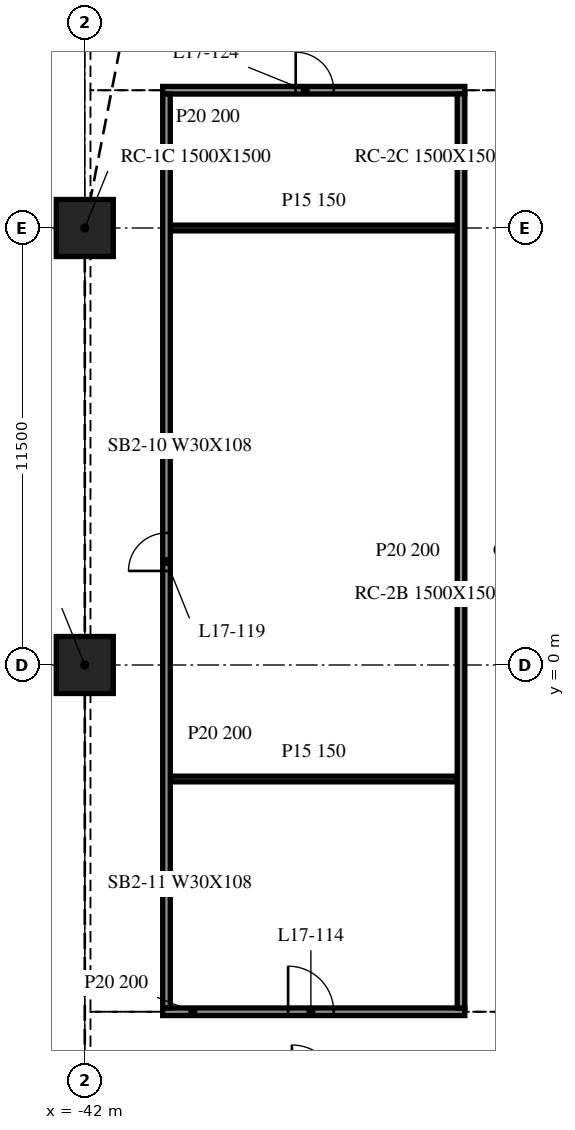
"""IFC4 building model, lengths in metres.
Left out: names, types, materials, properties, quantities, classifications, styles, units other than length and angle.
Written with IfcOpenShell. Run it as: python <this file> out.ifc"""

import sys

from ifc_helpers import new_model, si_unit, direction, frame, frame_2d, origin, origin_2d, place, context, subcontext, project, spatial, rectangle, extrude, element, fill, save


model = new_model("IFC4")
c1 = context("Model", 3, precision=1e-05, world=origin(), true_north=direction((0.0, 1.0)))
c2 = subcontext(c1, "Body", "Model", "MODEL_VIEW")
j1 = project(units=[si_unit("LENGTHUNIT", "METRE"), si_unit("PLANEANGLEUNIT", "RADIAN")], contexts=[c1])
p1 = place(None, origin())
s1 = spatial("IfcSite", under=j1, at=p1, CompositionType="ELEMENT")
p2 = place(p1, origin())
s2 = spatial("IfcBuilding", under=s1, at=p2, CompositionType="ELEMENT")
p3 = place(p2, frame((0.0, 0.0, 76.1)))
s3 = spatial("IfcBuildingStorey", under=s2, at=p3, CompositionType="ELEMENT", Elevation=76.1)
for number, where, z_axis, x_axis in (
    (1, (-42.0, 0.0, -0.34), (0.0, 0.0, 1.0), (1.0, 0.0, 0.0)),
    (2, (-42.0, 11.5, -0.34), (0.0, 0.0, 1.0), (1.0, 0.0, 0.0)),
):
    element("IfcColumn", number, at=place(p3, frame(where, z_axis=z_axis, x_axis=x_axis)), inside=s3, PredefinedType="COLUMN", context=c2, shape_type="SweptSolid", body=[
        extrude(rectangle(XDim=1.5, YDim=1.5, at=origin_2d()), origin(), (0.0, 0.0, 1.0), 4.09),
    ])
p4 = place(p3, frame((-39.95, -9.125, 0.0), z_axis=(0.0, 0.0, 1.0), x_axis=(1.0, 0.0, 0.0)))
e3 = element("IfcWall", 3, at=p4, inside=s3, PredefinedType="PARTITIONING", context=c2, shape_type="SweptSolid", body=[
    extrude(rectangle(XDim=7.95, YDim=0.2, at=frame_2d((3.975, 0.0))), origin(), (0.0, 0.0, 1.0), 3.75),
])
p5 = place(p4, frame((3.3, 0.0, 0.0)))
e4 = element("IfcOpeningElement", 4, at=p5, cuts=e3, PredefinedType="OPENING", context=c2, shape_type="SweptSolid", body=[
    extrude(rectangle(XDim=1.2, YDim=2.1, at=frame_2d((0.6, 1.05))), frame((0.0, 0.11, 0.0), z_axis=(0.0, -1.0, 0.0), x_axis=(1.0, 0.0, 0.0)), (0.0, 0.0, 1.0), 0.22),
])
for number, where, z_axis, x_axis in (
    (5, (-39.75, -3.0, 0.0), (0.0, 0.0, 1.0), (1.0, 0.0, 0.0)),
    (6, (-39.75, 11.5, 0.0), (0.0, 0.0, 1.0), (1.0, 0.0, 0.0)),
):
    element("IfcWall", number, at=place(p3, frame(where, z_axis=z_axis, x_axis=x_axis)), inside=s3, PredefinedType="PARTITIONING", context=c2, shape_type="SweptSolid", body=[
        extrude(rectangle(XDim=7.55, YDim=0.15, at=frame_2d((3.775, 0.0))), origin(), (0.0, 0.0, 1.0), 3.75),
    ])
p6 = place(p3, frame((-39.95, 15.125, 0.0), z_axis=(0.0, 0.0, 1.0), x_axis=(1.0, 0.0, 0.0)))
e7 = element("IfcWall", 7, at=p6, inside=s3, PredefinedType="PARTITIONING", context=c2, shape_type="SweptSolid", body=[
    extrude(rectangle(XDim=7.95, YDim=0.2, at=frame_2d((3.975, 0.0))), origin(), (0.0, 0.0, 1.0), 3.75),
])
p7 = place(p6, frame((3.5, 0.0, 0.0)))
e8 = element("IfcOpeningElement", 8, at=p7, cuts=e7, PredefinedType="OPENING", context=c2, shape_type="SweptSolid", body=[
    extrude(rectangle(XDim=1.0, YDim=2.1, at=frame_2d((0.5, 1.05))), frame((0.0, 0.11, 0.0), z_axis=(0.0, -1.0, 0.0), x_axis=(1.0, 0.0, 0.0)), (0.0, 0.0, 1.0), 0.22),
])
p8 = place(p3, frame((-39.85, -9.025, 0.0), z_axis=(0.0, 0.0, 1.0), x_axis=(0.0, 1.0, 0.0)))
e9 = element("IfcWall", 9, at=p8, inside=s3, PredefinedType="PARTITIONING", context=c2, shape_type="SweptSolid", body=[
    extrude(rectangle(XDim=24.05, YDim=0.2, at=frame_2d((12.025, 0.0))), origin(), (0.0, 0.0, 1.0), 3.75),
])
p9 = place(p8, frame((11.5, 0.0, 0.0)))
e10 = element("IfcOpeningElement", 10, at=p9, cuts=e9, PredefinedType="OPENING", context=c2, shape_type="SweptSolid", body=[
    extrude(rectangle(XDim=1.0, YDim=2.1, at=frame_2d((0.5, 1.05))), frame((0.0, 0.11, 0.0), z_axis=(0.0, -1.0, 0.0), x_axis=(1.0, 0.0, 0.0)), (0.0, 0.0, 1.0), 0.22),
])
p10 = place(p3, frame((-32.1, -9.025, 0.0), z_axis=(0.0, 0.0, 1.0), x_axis=(0.0, 1.0, 0.0)))
e11 = element("IfcWall", 11, at=p10, inside=s3, PredefinedType="PARTITIONING", context=c2, shape_type="SweptSolid", body=[
    extrude(rectangle(XDim=24.05, YDim=0.2, at=frame_2d((12.025, 0.0))), origin(), (0.0, 0.0, 1.0), 3.75),
])
p11 = place(p5, origin())
e12 = element("IfcDoor", 12, at=p11, inside=s3, OperationType="SINGLE_SWING_LEFT", PredefinedType="DOOR", context=c2, shape_type="SweptSolid", body=[
    extrude(rectangle(XDim=1.2, YDim=2.1, at=frame_2d((0.6, 1.05))), frame((0.0, 0.025, 0.0), z_axis=(0.0, -1.0, 0.0), x_axis=(1.0, 0.0, 0.0)), (0.0, 0.0, 1.0), 0.05),
])
fill(e4, e12)
p12 = place(p9, origin())
e13 = element("IfcDoor", 13, at=p12, inside=s3, OperationType="SINGLE_SWING_RIGHT", PredefinedType="DOOR", context=c2, shape_type="SweptSolid", body=[
    extrude(rectangle(XDim=1.0, YDim=2.1, at=frame_2d((0.5, 1.05))), frame((0.0, 0.025, 0.0), z_axis=(0.0, -1.0, 0.0), x_axis=(1.0, 0.0, 0.0)), (0.0, 0.0, 1.0), 0.05),
])
fill(e10, e13)
p13 = place(p7, origin())
e14 = element("IfcDoor", 14, at=p13, inside=s3, OperationType="SINGLE_SWING_LEFT", PredefinedType="DOOR", context=c2, shape_type="SweptSolid", body=[
    extrude(rectangle(XDim=1.0, YDim=2.1, at=frame_2d((0.5, 1.05))), frame((0.0, 0.025, 0.0), z_axis=(0.0, -1.0, 0.0), x_axis=(1.0, 0.0, 0.0)), (0.0, 0.0, 1.0), 0.05),
])
fill(e8, e14)
save(model, sys.argv[1])
